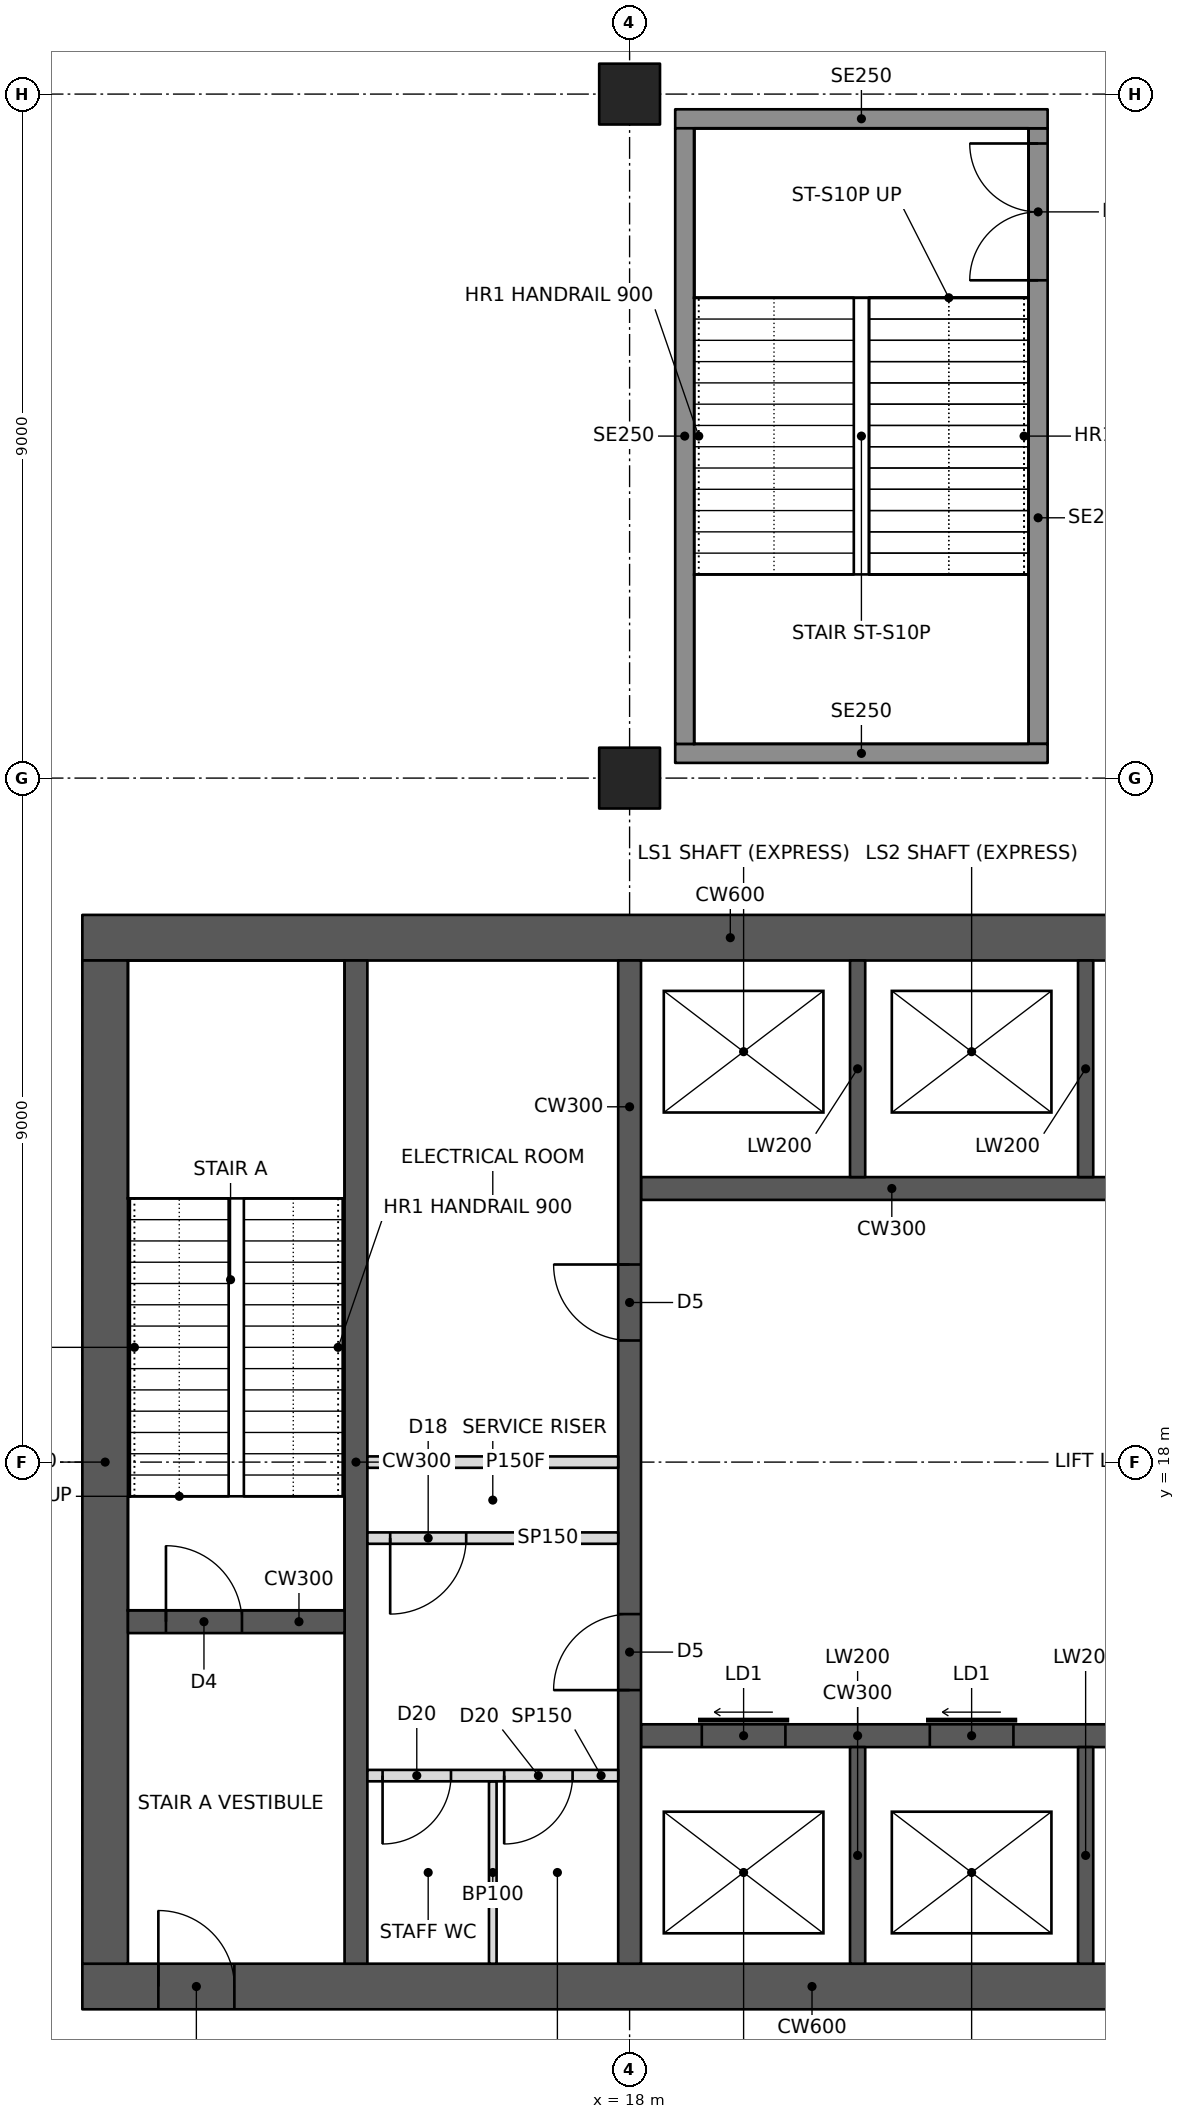
"""IFC4 building model, lengths in metres.
Left out: names, types, materials, properties, quantities, classifications, styles, units other than length and angle.
Written with IfcOpenShell. Run it as: python <this file> out.ifc"""

import sys

from ifc_helpers import new_model, si_unit, direction, frame, frame_2d, origin, origin_2d, place, context, subcontext, project, spatial, rectangle, hollow_rectangle, extrude, element, fill, save


model = new_model("IFC4")
c1 = context("Model", 3, precision=1e-05, world=origin(), true_north=direction((0.0, 1.0)))
c2 = subcontext(c1, "Body", "Model", "MODEL_VIEW")
j1 = project(units=[si_unit("LENGTHUNIT", "METRE"), si_unit("PLANEANGLEUNIT", "RADIAN")], contexts=[c1])
p1 = place(None, origin())
s1 = spatial("IfcSite", under=j1, at=p1, CompositionType="ELEMENT")
p2 = place(p1, origin())
s2 = spatial("IfcBuilding", under=s1, at=p2, CompositionType="ELEMENT")
p3 = place(p2, frame((0.0, 0.0, 6.0)))
s3 = spatial("IfcBuildingStorey", under=s2, at=p3, CompositionType="ELEMENT", Elevation=6.0)
for number, where, z_axis, x_axis in (
    (1, (18.0, 27.0, 0.0), (0.0, 0.0, 1.0), (1.0, 0.0, 0.0)),
    (2, (18.0, 36.0, 0.0), (0.0, 0.0, 1.0), (1.0, 0.0, 0.0)),
):
    element("IfcColumn", number, at=place(p3, frame(where, z_axis=z_axis, x_axis=x_axis)), inside=s3, PredefinedType="COLUMN", context=c2, shape_type="SweptSolid", body=[
        extrude(hollow_rectangle(XDim=0.8, YDim=0.8, WallThickness=0.1, at=origin_2d()), origin(), (0.0, 0.0, 1.0), 5.0),
    ])
p4 = place(p3, frame((10.8, 11.1, 0.0), z_axis=(0.0, 0.0, 1.0), x_axis=(1.0, 0.0, 0.0)))
e3 = element("IfcWall", 3, at=p4, inside=s3, PredefinedType="SHEAR", context=c2, shape_type="SweptSolid", body=[
    extrude(rectangle(XDim=23.4, YDim=0.6, at=frame_2d((11.7, 0.0))), origin(), (0.0, 0.0, 1.0), 5.0),
])
p5 = place(p4, frame((1.0, 0.0, 0.0)))
e4 = element("IfcOpeningElement", 4, at=p5, cuts=e3, PredefinedType="OPENING", context=c2, shape_type="SweptSolid", body=[
    extrude(rectangle(XDim=1.0, YDim=2.1, at=frame_2d((0.5, 1.05))), frame((0.0, 0.31, 0.0), z_axis=(0.0, -1.0, 0.0), x_axis=(1.0, 0.0, 0.0)), (0.0, 0.0, 1.0), 0.62),
])
p6 = place(p4, frame((17.2, 0.0, 0.0)))
e5 = element("IfcOpeningElement", 5, at=p6, cuts=e3, PredefinedType="OPENING", context=c2, shape_type="SweptSolid", body=[
    extrude(rectangle(XDim=1.8, YDim=2.1, at=frame_2d((0.9, 1.05))), frame((0.0, 0.31, 0.0), z_axis=(0.0, -1.0, 0.0), x_axis=(1.0, 0.0, 0.0)), (0.0, 0.0, 1.0), 0.62),
])
p7 = place(p3, frame((10.8, 24.9, 0.0), z_axis=(0.0, 0.0, 1.0), x_axis=(1.0, 0.0, 0.0)))
e6 = element("IfcWall", 6, at=p7, inside=s3, PredefinedType="SHEAR", context=c2, shape_type="SweptSolid", body=[
    extrude(rectangle(XDim=23.4, YDim=0.6, at=frame_2d((11.7, 0.0))), origin(), (0.0, 0.0, 1.0), 5.0),
])
p8 = place(p7, frame((17.2, 0.0, 0.0)))
e7 = element("IfcOpeningElement", 7, at=p8, cuts=e6, PredefinedType="OPENING", context=c2, shape_type="SweptSolid", body=[
    extrude(rectangle(XDim=1.8, YDim=2.1, at=frame_2d((0.9, 1.05))), frame((0.0, 0.31, 0.0), z_axis=(0.0, -1.0, 0.0), x_axis=(1.0, 0.0, 0.0)), (0.0, 0.0, 1.0), 0.62),
])
p9 = place(p7, frame((21.1, 0.0, 0.0)))
e8 = element("IfcOpeningElement", 8, at=p9, cuts=e6, PredefinedType="OPENING", context=c2, shape_type="SweptSolid", body=[
    extrude(rectangle(XDim=1.0, YDim=2.1, at=frame_2d((0.5, 1.05))), frame((0.0, 0.31, 0.0), z_axis=(0.0, -1.0, 0.0), x_axis=(1.0, 0.0, 0.0)), (0.0, 0.0, 1.0), 0.62),
])
p10 = place(p3, frame((11.1, 11.4, 0.0), z_axis=(0.0, 0.0, 1.0), x_axis=(0.0, 1.0, 0.0)))
e9 = element("IfcWall", 9, at=p10, inside=s3, PredefinedType="SHEAR", context=c2, shape_type="SweptSolid", body=[
    extrude(rectangle(XDim=13.2, YDim=0.6, at=frame_2d((6.6, 0.0))), origin(), (0.0, 0.0, 1.0), 5.0),
])
p11 = place(p3, frame((14.4, 11.4, 0.0), z_axis=(0.0, 0.0, 1.0), x_axis=(0.0, 1.0, 0.0)))
e10 = element("IfcWall", 10, at=p11, inside=s3, PredefinedType="SHEAR", context=c2, shape_type="SweptSolid", body=[
    extrude(rectangle(XDim=13.2, YDim=0.3, at=frame_2d((6.6, 0.0))), origin(), (0.0, 0.0, 1.0), 5.0),
])
p12 = place(p3, frame((11.4, 15.9, 0.0), z_axis=(0.0, 0.0, 1.0), x_axis=(1.0, 0.0, 0.0)))
e11 = element("IfcWall", 11, at=p12, inside=s3, PredefinedType="SHEAR", context=c2, shape_type="SweptSolid", body=[
    extrude(rectangle(XDim=2.85, YDim=0.3, at=frame_2d((1.425, 0.0))), origin(), (0.0, 0.0, 1.0), 5.0),
])
p13 = place(p12, frame((0.5, 0.0, 0.0)))
e12 = element("IfcOpeningElement", 12, at=p13, cuts=e11, PredefinedType="OPENING", context=c2, shape_type="SweptSolid", body=[
    extrude(rectangle(XDim=1.0, YDim=2.1, at=frame_2d((0.5, 1.05))), frame((0.0, 0.16, 0.0), z_axis=(0.0, -1.0, 0.0), x_axis=(1.0, 0.0, 0.0)), (0.0, 0.0, 1.0), 0.32),
])
p14 = place(p3, frame((18.0, 11.4, 0.0), z_axis=(0.0, 0.0, 1.0), x_axis=(0.0, 1.0, 0.0)))
e13 = element("IfcWall", 13, at=p14, inside=s3, PredefinedType="SHEAR", context=c2, shape_type="SweptSolid", body=[
    extrude(rectangle(XDim=13.2, YDim=0.3, at=frame_2d((6.6, 0.0))), origin(), (0.0, 0.0, 1.0), 5.0),
])
p15 = place(p14, frame((3.6, 0.0, 0.0)))
e14 = element("IfcOpeningElement", 14, at=p15, cuts=e13, PredefinedType="OPENING", context=c2, shape_type="SweptSolid", body=[
    extrude(rectangle(XDim=1.0, YDim=2.1, at=frame_2d((0.5, 1.05))), frame((0.0, 0.16, 0.0), z_axis=(0.0, -1.0, 0.0), x_axis=(1.0, 0.0, 0.0)), (0.0, 0.0, 1.0), 0.32),
])
p16 = place(p14, frame((8.2, 0.0, 0.0)))
e15 = element("IfcOpeningElement", 15, at=p16, cuts=e13, PredefinedType="OPENING", context=c2, shape_type="SweptSolid", body=[
    extrude(rectangle(XDim=1.0, YDim=2.1, at=frame_2d((0.5, 1.05))), frame((0.0, 0.16, 0.0), z_axis=(0.0, -1.0, 0.0), x_axis=(1.0, 0.0, 0.0)), (0.0, 0.0, 1.0), 0.32),
])
p17 = place(p3, frame((14.55, 18.0, 0.0), z_axis=(0.0, 0.0, 1.0), x_axis=(1.0, 0.0, 0.0)))
e16 = element("IfcWall", 16, at=p17, inside=s3, PredefinedType="PARTITIONING", context=c2, shape_type="SweptSolid", body=[
    extrude(rectangle(XDim=3.3, YDim=0.15, at=frame_2d((1.65, 0.0))), origin(), (0.0, 0.0, 1.0), 4.75),
])
p18 = place(p3, frame((18.15, 14.4, 0.0), z_axis=(0.0, 0.0, 1.0), x_axis=(1.0, 0.0, 0.0)))
e17 = element("IfcWall", 17, at=p18, inside=s3, PredefinedType="SHEAR", context=c2, shape_type="SweptSolid", body=[
    extrude(rectangle(XDim=9.0, YDim=0.3, at=frame_2d((4.5, 0.0))), origin(), (0.0, 0.0, 1.0), 5.0),
])
p19 = place(p18, frame((0.8, 0.0, 0.0)))
e18 = element("IfcOpeningElement", 18, at=p19, cuts=e17, PredefinedType="OPENING", context=c2, shape_type="SweptSolid", body=[
    extrude(rectangle(XDim=1.1, YDim=2.1, at=frame_2d((0.55, 1.05))), frame((0.0, 0.16, 0.0), z_axis=(0.0, -1.0, 0.0), x_axis=(1.0, 0.0, 0.0)), (0.0, 0.0, 1.0), 0.32),
])
p20 = place(p18, frame((3.8, 0.0, 0.0)))
e19 = element("IfcOpeningElement", 19, at=p20, cuts=e17, PredefinedType="OPENING", context=c2, shape_type="SweptSolid", body=[
    extrude(rectangle(XDim=1.1, YDim=2.1, at=frame_2d((0.55, 1.05))), frame((0.0, 0.16, 0.0), z_axis=(0.0, -1.0, 0.0), x_axis=(1.0, 0.0, 0.0)), (0.0, 0.0, 1.0), 0.32),
])
p21 = place(p18, frame((6.75, 0.0, 0.0)))
e20 = element("IfcOpeningElement", 20, at=p21, cuts=e17, PredefinedType="OPENING", context=c2, shape_type="SweptSolid", body=[
    extrude(rectangle(XDim=1.2, YDim=2.1, at=frame_2d((0.6, 1.05))), frame((0.0, 0.16, 0.0), z_axis=(0.0, -1.0, 0.0), x_axis=(1.0, 0.0, 0.0)), (0.0, 0.0, 1.0), 0.32),
])
for number, where, z_axis, x_axis in (
    (21, (21.0, 11.4, 0.0), (0.0, 0.0, 1.0), (0.0, 1.0, 0.0)),
    (22, (24.0, 11.4, 0.0), (0.0, 0.0, 1.0), (0.0, 1.0, 0.0)),
):
    element("IfcWall", number, at=place(p3, frame(where, z_axis=z_axis, x_axis=x_axis)), inside=s3, PredefinedType="SHEAR", context=c2, shape_type="SweptSolid", body=[
        extrude(rectangle(XDim=2.85, YDim=0.2, at=frame_2d((1.425, 0.0))), origin(), (0.0, 0.0, 1.0), 5.0),
    ])
p22 = place(p3, frame((18.15, 21.6, 0.0), z_axis=(0.0, 0.0, 1.0), x_axis=(1.0, 0.0, 0.0)))
e23 = element("IfcWall", 23, at=p22, inside=s3, PredefinedType="SHEAR", context=c2, shape_type="SweptSolid", body=[
    extrude(rectangle(XDim=9.0, YDim=0.3, at=frame_2d((4.5, 0.0))), origin(), (0.0, 0.0, 1.0), 5.0),
])
p23 = place(p22, frame((6.75, 0.0, 0.0)))
e24 = element("IfcOpeningElement", 24, at=p23, cuts=e23, PredefinedType="OPENING", context=c2, shape_type="SweptSolid", body=[
    extrude(rectangle(XDim=1.2, YDim=2.1, at=frame_2d((0.6, 1.05))), frame((0.0, 0.16, 0.0), z_axis=(0.0, -1.0, 0.0), x_axis=(1.0, 0.0, 0.0)), (0.0, 0.0, 1.0), 0.32),
])
for number, where, z_axis, x_axis in (
    (25, (21.0, 21.75, 0.0), (0.0, 0.0, 1.0), (0.0, 1.0, 0.0)),
    (26, (24.0, 21.75, 0.0), (0.0, 0.0, 1.0), (0.0, 1.0, 0.0)),
):
    element("IfcWall", number, at=place(p3, frame(where, z_axis=z_axis, x_axis=x_axis)), inside=s3, PredefinedType="SHEAR", context=c2, shape_type="SweptSolid", body=[
        extrude(rectangle(XDim=2.85, YDim=0.2, at=frame_2d((1.425, 0.0))), origin(), (0.0, 0.0, 1.0), 5.0),
    ])
p24 = place(p3, frame((14.55, 17.0, 0.0), z_axis=(0.0, 0.0, 1.0), x_axis=(1.0, 0.0, 0.0)))
e27 = element("IfcWall", 27, at=p24, inside=s3, PredefinedType="PARTITIONING", context=c2, shape_type="SweptSolid", body=[
    extrude(rectangle(XDim=3.3, YDim=0.15, at=frame_2d((1.65, 0.0))), origin(), (0.0, 0.0, 1.0), 4.75),
])
p25 = place(p24, frame((0.3, 0.0, 0.0)))
e28 = element("IfcOpeningElement", 28, at=p25, cuts=e27, PredefinedType="OPENING", context=c2, shape_type="SweptSolid", body=[
    extrude(rectangle(XDim=1.0, YDim=2.1, at=frame_2d((0.5, 1.05))), frame((0.0, 0.085, 0.0), z_axis=(0.0, -1.0, 0.0), x_axis=(1.0, 0.0, 0.0)), (0.0, 0.0, 1.0), 0.17),
])
p26 = place(p3, frame((14.55, 13.875, 0.0), z_axis=(0.0, 0.0, 1.0), x_axis=(1.0, 0.0, 0.0)))
e29 = element("IfcWall", 29, at=p26, inside=s3, PredefinedType="PARTITIONING", context=c2, shape_type="SweptSolid", body=[
    extrude(rectangle(XDim=3.3, YDim=0.15, at=frame_2d((1.65, 0.0))), origin(), (0.0, 0.0, 1.0), 4.75),
])
p27 = place(p26, frame((0.2, 0.0, 0.0)))
e30 = element("IfcOpeningElement", 30, at=p27, cuts=e29, PredefinedType="OPENING", context=c2, shape_type="SweptSolid", body=[
    extrude(rectangle(XDim=0.9, YDim=2.1, at=frame_2d((0.45, 1.05))), frame((0.0, 0.085, 0.0), z_axis=(0.0, -1.0, 0.0), x_axis=(1.0, 0.0, 0.0)), (0.0, 0.0, 1.0), 0.17),
])
p28 = place(p26, frame((1.8, 0.0, 0.0)))
e31 = element("IfcOpeningElement", 31, at=p28, cuts=e29, PredefinedType="OPENING", context=c2, shape_type="SweptSolid", body=[
    extrude(rectangle(XDim=0.9, YDim=2.1, at=frame_2d((0.45, 1.05))), frame((0.0, 0.085, 0.0), z_axis=(0.0, -1.0, 0.0), x_axis=(1.0, 0.0, 0.0)), (0.0, 0.0, 1.0), 0.17),
])
p29 = place(p3, frame((16.2, 11.4, 0.0), z_axis=(0.0, 0.0, 1.0), x_axis=(0.0, 1.0, 0.0)))
e32 = element("IfcWall", 32, at=p29, inside=s3, PredefinedType="PARTITIONING", context=c2, shape_type="SweptSolid", body=[
    extrude(rectangle(XDim=2.4, YDim=0.1, at=frame_2d((1.2, 0.0))), origin(), (0.0, 0.0, 1.0), 4.75),
])
for number, where, z_axis, x_axis in (
    (33, (18.6, 27.325, 0.0), (0.0, 0.0, 1.0), (1.0, 0.0, 0.0)),
    (34, (18.6, 35.675, 0.0), (0.0, 0.0, 1.0), (1.0, 0.0, 0.0)),
):
    element("IfcWall", number, at=place(p3, frame(where, z_axis=z_axis, x_axis=x_axis)), inside=s3, PredefinedType="SOLIDWALL", context=c2, shape_type="SweptSolid", body=[
        extrude(rectangle(XDim=4.9, YDim=0.25, at=frame_2d((2.45, 0.0))), origin(), (0.0, 0.0, 1.0), 4.75),
    ])
p30 = place(p3, frame((18.725, 27.45, 0.0), z_axis=(0.0, 0.0, 1.0), x_axis=(0.0, 1.0, 0.0)))
e35 = element("IfcWall", 35, at=p30, inside=s3, PredefinedType="SOLIDWALL", context=c2, shape_type="SweptSolid", body=[
    extrude(rectangle(XDim=8.1, YDim=0.25, at=frame_2d((4.05, 0.0))), origin(), (0.0, 0.0, 1.0), 4.75),
])
p31 = place(p3, frame((23.375, 27.45, 0.0), z_axis=(0.0, 0.0, 1.0), x_axis=(0.0, 1.0, 0.0)))
e36 = element("IfcWall", 36, at=p31, inside=s3, PredefinedType="SOLIDWALL", context=c2, shape_type="SweptSolid", body=[
    extrude(rectangle(XDim=8.1, YDim=0.25, at=frame_2d((4.05, 0.0))), origin(), (0.0, 0.0, 1.0), 4.75),
])
p32 = place(p31, frame((6.1, 0.0, 0.0)))
e37 = element("IfcOpeningElement", 37, at=p32, cuts=e36, PredefinedType="OPENING", context=c2, shape_type="SweptSolid", body=[
    extrude(rectangle(XDim=1.8, YDim=2.1, at=frame_2d((0.9, 1.05))), frame((0.0, 0.135, 0.0), z_axis=(0.0, -1.0, 0.0), x_axis=(1.0, 0.0, 0.0)), (0.0, 0.0, 1.0), 0.27),
])
p33 = place(p25, frame((1.0, 0.0, 0.0), z_axis=(0.0, 0.0, 1.0), x_axis=(-1.0, 0.0, 0.0)))
e38 = element("IfcDoor", 38, at=p33, inside=s3, OperationType="SINGLE_SWING_RIGHT", PredefinedType="DOOR", context=c2, shape_type="SweptSolid", body=[
    extrude(rectangle(XDim=1.0, YDim=2.1, at=frame_2d((0.5, 1.05))), frame((0.0, 0.025, 0.0), z_axis=(0.0, -1.0, 0.0), x_axis=(1.0, 0.0, 0.0)), (0.0, 0.0, 1.0), 0.05),
])
fill(e28, e38)
p34 = place(p27, frame((0.9, 0.0, 0.0), z_axis=(0.0, 0.0, 1.0), x_axis=(-1.0, 0.0, 0.0)))
e39 = element("IfcDoor", 39, at=p34, inside=s3, OperationType="SINGLE_SWING_RIGHT", PredefinedType="DOOR", context=c2, shape_type="SweptSolid", body=[
    extrude(rectangle(XDim=0.9, YDim=2.1, at=frame_2d((0.45, 1.05))), frame((0.0, 0.025, 0.0), z_axis=(0.0, -1.0, 0.0), x_axis=(1.0, 0.0, 0.0)), (0.0, 0.0, 1.0), 0.05),
])
fill(e30, e39)
p35 = place(p28, frame((0.9, 0.0, 0.0), z_axis=(0.0, 0.0, 1.0), x_axis=(-1.0, 0.0, 0.0)))
e40 = element("IfcDoor", 40, at=p35, inside=s3, OperationType="SINGLE_SWING_RIGHT", PredefinedType="DOOR", context=c2, shape_type="SweptSolid", body=[
    extrude(rectangle(XDim=0.9, YDim=2.1, at=frame_2d((0.45, 1.05))), frame((0.0, 0.025, 0.0), z_axis=(0.0, -1.0, 0.0), x_axis=(1.0, 0.0, 0.0)), (0.0, 0.0, 1.0), 0.05),
])
fill(e31, e40)
p36 = place(p5, origin())
e41 = element("IfcDoor", 41, at=p36, inside=s3, OperationType="SINGLE_SWING_LEFT", PredefinedType="DOOR", context=c2, shape_type="SweptSolid", body=[
    extrude(rectangle(XDim=1.0, YDim=2.1, at=frame_2d((0.5, 1.05))), frame((0.0, 0.025, 0.0), z_axis=(0.0, -1.0, 0.0), x_axis=(1.0, 0.0, 0.0)), (0.0, 0.0, 1.0), 0.05),
])
fill(e4, e41)
p37 = place(p13, origin())
e42 = element("IfcDoor", 42, at=p37, inside=s3, OperationType="SINGLE_SWING_LEFT", PredefinedType="DOOR", context=c2, shape_type="SweptSolid", body=[
    extrude(rectangle(XDim=1.0, YDim=2.1, at=frame_2d((0.5, 1.05))), frame((0.0, 0.025, 0.0), z_axis=(0.0, -1.0, 0.0), x_axis=(1.0, 0.0, 0.0)), (0.0, 0.0, 1.0), 0.05),
])
fill(e12, e42)
p38 = place(p15, origin())
e43 = element("IfcDoor", 43, at=p38, inside=s3, OperationType="SINGLE_SWING_LEFT", PredefinedType="DOOR", context=c2, shape_type="SweptSolid", body=[
    extrude(rectangle(XDim=1.0, YDim=2.1, at=frame_2d((0.5, 1.05))), frame((0.0, 0.025, 0.0), z_axis=(0.0, -1.0, 0.0), x_axis=(1.0, 0.0, 0.0)), (0.0, 0.0, 1.0), 0.05),
])
fill(e14, e43)
p39 = place(p16, origin())
e44 = element("IfcDoor", 44, at=p39, inside=s3, OperationType="SINGLE_SWING_RIGHT", PredefinedType="DOOR", context=c2, shape_type="SweptSolid", body=[
    extrude(rectangle(XDim=1.0, YDim=2.1, at=frame_2d((0.5, 1.05))), frame((0.0, 0.025, 0.0), z_axis=(0.0, -1.0, 0.0), x_axis=(1.0, 0.0, 0.0)), (0.0, 0.0, 1.0), 0.05),
])
fill(e15, e44)
p40 = place(p19, origin())
e45 = element("IfcDoor", 45, at=p40, inside=s3, OperationType="SLIDING_TO_LEFT", PredefinedType="DOOR", context=c2, shape_type="SweptSolid", body=[
    extrude(rectangle(XDim=1.1, YDim=2.1, at=frame_2d((0.55, 1.05))), frame((0.0, 0.025, 0.0), z_axis=(0.0, -1.0, 0.0), x_axis=(1.0, 0.0, 0.0)), (0.0, 0.0, 1.0), 0.05),
])
fill(e18, e45)
p41 = place(p20, origin())
e46 = element("IfcDoor", 46, at=p41, inside=s3, OperationType="SLIDING_TO_LEFT", PredefinedType="DOOR", context=c2, shape_type="SweptSolid", body=[
    extrude(rectangle(XDim=1.1, YDim=2.1, at=frame_2d((0.55, 1.05))), frame((0.0, 0.025, 0.0), z_axis=(0.0, -1.0, 0.0), x_axis=(1.0, 0.0, 0.0)), (0.0, 0.0, 1.0), 0.05),
])
fill(e19, e46)
p42 = place(p32, origin())
e47 = element("IfcDoor", 47, at=p42, inside=s3, OperationType="DOUBLE_DOOR_SINGLE_SWING", PredefinedType="DOOR", context=c2, shape_type="SweptSolid", body=[
    extrude(rectangle(XDim=1.8, YDim=2.1, at=frame_2d((0.9, 1.05))), frame((0.0, 0.025, 0.0), z_axis=(0.0, -1.0, 0.0), x_axis=(1.0, 0.0, 0.0)), (0.0, 0.0, 1.0), 0.05),
])
fill(e37, e47)
save(model, sys.argv[1])
